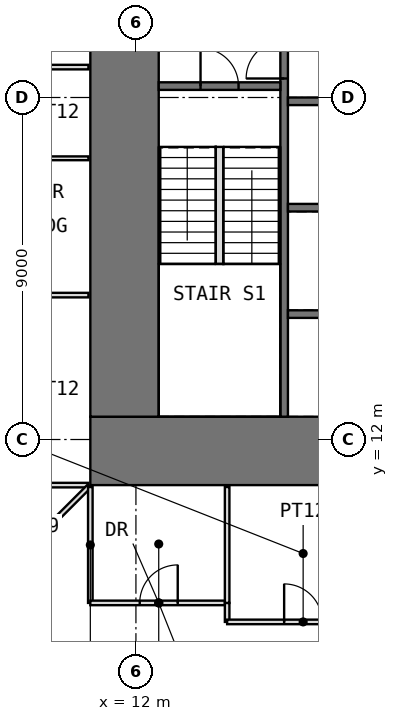
"""IFC4 building model, lengths in metres.
Left out: names, types, materials, properties, quantities, classifications, styles, units other than length and angle.
Written with IfcOpenShell. Run it as: python <this file> out.ifc"""

import sys

from ifc_helpers import new_model, si_unit, direction, frame, frame_2d, origin, place, context, subcontext, project, spatial, rectangle, extrude, element, fill, save


model = new_model("IFC4")
c1 = context("Model", 3, precision=1e-05, world=origin(), true_north=direction((0.0, 1.0)))
c2 = subcontext(c1, "Body", "Model", "MODEL_VIEW")
j1 = project(units=[si_unit("LENGTHUNIT", "METRE"), si_unit("PLANEANGLEUNIT", "RADIAN")], contexts=[c1])
p1 = place(None, origin())
s1 = spatial("IfcSite", under=j1, at=p1, CompositionType="ELEMENT")
p2 = place(p1, origin())
s2 = spatial("IfcBuilding", under=s1, at=p2, CompositionType="ELEMENT")
p3 = place(p2, frame((0.0, 0.0, 30.5)))
s3 = spatial("IfcBuildingStorey", under=s2, at=p3, CompositionType="ELEMENT", Elevation=30.5)
p4 = place(p3, frame((10.8, 11.7, -0.05), z_axis=(0.0, 0.0, 1.0), x_axis=(1.0, 0.0, 0.0)))
e1 = element("IfcWall", 1, at=p4, inside=s3, PredefinedType="SHEAR", context=c2, shape_type="SweptSolid", body=[
    extrude(rectangle(XDim=20.4, YDim=1.8, at=frame_2d((10.2, 0.0))), origin(), (0.0, 0.0, 1.0), 4.0),
])
p5 = place(p4, frame((9.2, 0.0, 0.05)))
e2 = element("IfcOpeningElement", 2, at=p5, cuts=e1, PredefinedType="OPENING", context=c2, shape_type="SweptSolid", body=[
    extrude(rectangle(XDim=2.0, YDim=2.2, at=frame_2d((1.0, 1.1))), frame((0.0, 0.91, 0.0), z_axis=(0.0, -1.0, 0.0), x_axis=(1.0, 0.0, 0.0)), (0.0, 0.0, 1.0), 1.82),
])
p6 = place(p3, frame((11.7, 12.6, -0.05), z_axis=(0.0, 0.0, 1.0), x_axis=(0.0, 1.0, 0.0)))
e3 = element("IfcWall", 3, at=p6, inside=s3, PredefinedType="SHEAR", context=c2, shape_type="SweptSolid", body=[
    extrude(rectangle(XDim=16.8, YDim=1.8, at=frame_2d((8.4, 0.0))), origin(), (0.0, 0.0, 1.0), 4.0),
])
p7 = place(p6, frame((9.9, 0.0, 0.05)))
e4 = element("IfcOpeningElement", 4, at=p7, cuts=e3, PredefinedType="OPENING", context=c2, shape_type="SweptSolid", body=[
    extrude(rectangle(XDim=1.0, YDim=2.2, at=frame_2d((0.5, 1.1))), frame((0.0, 0.91, 0.0), z_axis=(0.0, -1.0, 0.0), x_axis=(1.0, 0.0, 0.0)), (0.0, 0.0, 1.0), 1.82),
])
p8 = place(p3, frame((15.9, 12.6, -0.05), z_axis=(0.0, 0.0, 1.0), x_axis=(0.0, 1.0, 0.0)))
e5 = element("IfcWall", 5, at=p8, inside=s3, PredefinedType="SHEAR", context=c2, shape_type="SweptSolid", body=[
    extrude(rectangle(XDim=16.8, YDim=0.2, at=frame_2d((8.4, 0.0))), origin(), (0.0, 0.0, 1.0), 4.0),
])
p9 = place(p8, frame((8.9, 0.0, 0.05)))
e6 = element("IfcOpeningElement", 6, at=p9, cuts=e5, PredefinedType="OPENING", context=c2, shape_type="SweptSolid", body=[
    extrude(rectangle(XDim=1.0, YDim=2.2, at=frame_2d((0.5, 1.1))), frame((0.0, 0.11, 0.0), z_axis=(0.0, -1.0, 0.0), x_axis=(1.0, 0.0, 0.0)), (0.0, 0.0, 1.0), 0.22),
])
p10 = place(p3, frame((12.6, 21.3, -0.05), z_axis=(0.0, 0.0, 1.0), x_axis=(1.0, 0.0, 0.0)))
e7 = element("IfcWall", 7, at=p10, inside=s3, PredefinedType="SHEAR", context=c2, shape_type="SweptSolid", body=[
    extrude(rectangle(XDim=3.2, YDim=0.2, at=frame_2d((1.6, 0.0))), origin(), (0.0, 0.0, 1.0), 4.0),
])
p11 = place(p10, frame((1.1, 0.0, 0.05)))
e8 = element("IfcOpeningElement", 8, at=p11, cuts=e7, PredefinedType="OPENING", context=c2, shape_type="SweptSolid", body=[
    extrude(rectangle(XDim=1.0, YDim=2.2, at=frame_2d((0.5, 1.1))), frame((0.0, 0.11, 0.0), z_axis=(0.0, -1.0, 0.0), x_axis=(1.0, 0.0, 0.0)), (0.0, 0.0, 1.0), 0.22),
])
for number, where, z_axis, x_axis in (
    (9, (16.0, 15.3, -0.05), (0.0, 0.0, 1.0), (1.0, 0.0, 0.0)),
    (10, (16.0, 18.1, -0.05), (0.0, 0.0, 1.0), (1.0, 0.0, 0.0)),
    (11, (16.0, 20.9, -0.05), (0.0, 0.0, 1.0), (1.0, 0.0, 0.0)),
):
    element("IfcWall", number, at=place(p3, frame(where, z_axis=z_axis, x_axis=x_axis)), inside=s3, PredefinedType="SHEAR", context=c2, shape_type="SweptSolid", body=[
        extrude(rectangle(XDim=3.2, YDim=0.2, at=frame_2d((1.6, 0.0))), origin(), (0.0, 0.0, 1.0), 4.0),
    ])
for number, where, z_axis, x_axis in (
    (12, (7.0, 10.8, 0.0), (0.0, 0.0, 1.0), (1.0, 0.0, 0.0)),
    (13, (7.0, 15.8, 0.0), (0.0, 0.0, 1.0), (1.0, 0.0, 0.0)),
):
    element("IfcWall", number, at=place(p3, frame(where, z_axis=z_axis, x_axis=x_axis)), inside=s3, PredefinedType="PARTITIONING", context=c2, shape_type="SweptSolid", body=[
        extrude(rectangle(XDim=3.75, YDim=0.12, at=frame_2d((1.875, 0.0))), origin(), (0.0, 0.0, 1.0), 3.75),
    ])
p12 = place(p3, frame((7.0, 19.4, 0.0), z_axis=(0.0, 0.0, 1.0), x_axis=(1.0, 0.0, 0.0)))
e14 = element("IfcWall", 14, at=p12, inside=s3, PredefinedType="PARTITIONING", context=c2, shape_type="SweptSolid", body=[
    extrude(rectangle(XDim=3.75, YDim=0.1, at=frame_2d((1.875, 0.0))), origin(), (0.0, 0.0, 1.0), 3.75),
])
p13 = place(p3, frame((7.0, 21.8, 0.0), z_axis=(0.0, 0.0, 1.0), x_axis=(1.0, 0.0, 0.0)))
e15 = element("IfcWall", 15, at=p13, inside=s3, PredefinedType="PARTITIONING", context=c2, shape_type="SweptSolid", body=[
    extrude(rectangle(XDim=3.75, YDim=0.12, at=frame_2d((1.875, 0.0))), origin(), (0.0, 0.0, 1.0), 3.75),
])
p14 = place(p13, frame((0.3, 0.0, 0.0)))
e16 = element("IfcOpeningElement", 16, at=p14, cuts=e15, PredefinedType="OPENING", context=c2, shape_type="SweptSolid", body=[
    extrude(rectangle(XDim=1.0, YDim=2.4, at=frame_2d((0.5, 1.2))), frame((0.0, 0.07, 0.0), z_axis=(0.0, -1.0, 0.0), x_axis=(1.0, 0.0, 0.0)), (0.0, 0.0, 1.0), 0.14),
])
p15 = place(p3, frame((7.11, 7.11, 0.0), z_axis=(0.0, 0.0, 1.0), x_axis=(0.707106781187, 0.707106781187, 0.0)))
e17 = element("IfcWall", 17, at=p15, inside=s3, PredefinedType="PARTITIONING", context=c2, shape_type="SweptSolid", body=[
    extrude(rectangle(XDim=5.168, YDim=0.12, at=frame_2d((2.584, 0.0))), origin(), (0.0, 0.0, 1.0), 3.75),
])
p16 = place(p3, frame((10.8, 7.7, 0.0), z_axis=(0.0, 0.0, 1.0), x_axis=(0.0, 1.0, 0.0)))
e18 = element("IfcWall", 18, at=p16, inside=s3, PredefinedType="PARTITIONING", context=c2, shape_type="SweptSolid", body=[
    extrude(rectangle(XDim=3.05, YDim=0.12, at=frame_2d((1.525, 0.0))), origin(), (0.0, 0.0, 1.0), 3.75),
])
p17 = place(p3, frame((10.8, 7.7, 0.0), z_axis=(0.0, 0.0, 1.0), x_axis=(1.0, 0.0, 0.0)))
e19 = element("IfcWall", 19, at=p17, inside=s3, PredefinedType="PARTITIONING", context=c2, shape_type="SweptSolid", body=[
    extrude(rectangle(XDim=3.6, YDim=0.12, at=frame_2d((1.8, 0.0))), origin(), (0.0, 0.0, 1.0), 3.75),
])
p18 = place(p17, frame((1.3, 0.0, 0.0)))
e20 = element("IfcOpeningElement", 20, at=p18, cuts=e19, PredefinedType="OPENING", context=c2, shape_type="SweptSolid", body=[
    extrude(rectangle(XDim=1.0, YDim=2.2, at=frame_2d((0.5, 1.1))), frame((0.0, 0.07, 0.0), z_axis=(0.0, -1.0, 0.0), x_axis=(1.0, 0.0, 0.0)), (0.0, 0.0, 1.0), 0.14),
])
p19 = place(p3, frame((14.4, 7.2, 0.0), z_axis=(0.0, 0.0, 1.0), x_axis=(0.0, 1.0, 0.0)))
e21 = element("IfcWall", 21, at=p19, inside=s3, PredefinedType="PARTITIONING", context=c2, shape_type="SweptSolid", body=[
    extrude(rectangle(XDim=0.5, YDim=0.12, at=frame_2d((0.25, 0.0))), origin(), (0.0, 0.0, 1.0), 3.75),
])
p20 = place(p3, frame((14.4, 7.2, 0.0), z_axis=(0.0, 0.0, 1.0), x_axis=(1.0, 0.0, 0.0)))
e22 = element("IfcWall", 22, at=p20, inside=s3, PredefinedType="PARTITIONING", context=c2, shape_type="SweptSolid", body=[
    extrude(rectangle(XDim=4.0, YDim=0.12, at=frame_2d((2.0, 0.0))), origin(), (0.0, 0.0, 1.0), 3.75),
])
p21 = place(p20, frame((1.5, 0.0, 0.0)))
e23 = element("IfcOpeningElement", 23, at=p21, cuts=e22, PredefinedType="OPENING", context=c2, shape_type="SweptSolid", body=[
    extrude(rectangle(XDim=1.0, YDim=2.4, at=frame_2d((0.5, 1.2))), frame((0.0, 0.07, 0.0), z_axis=(0.0, -1.0, 0.0), x_axis=(1.0, 0.0, 0.0)), (0.0, 0.0, 1.0), 0.14),
])
p22 = place(p3, frame((14.4, 7.7, 0.0), z_axis=(0.0, 0.0, 1.0), x_axis=(0.0, 1.0, 0.0)))
e24 = element("IfcWall", 24, at=p22, inside=s3, PredefinedType="PARTITIONING", context=c2, shape_type="SweptSolid", body=[
    extrude(rectangle(XDim=3.05, YDim=0.12, at=frame_2d((1.525, 0.0))), origin(), (0.0, 0.0, 1.0), 3.75),
])
p23 = place(p3, frame((14.2, 16.62, 0.0), z_axis=(0.0, 0.0, 1.0), x_axis=(0.0, 1.0, 0.0)))
e25 = element("IfcWall", 25, at=p23, inside=s3, PredefinedType="PARTITIONING", context=c2, shape_type="SweptSolid", body=[
    extrude(rectangle(XDim=3.08, YDim=0.2, at=frame_2d((1.54, 0.0))), origin(), (0.0, 0.0, 1.0), 4.0),
])
p24 = place(p11, origin())
e26 = element("IfcDoor", 26, at=p24, inside=s3, OperationType="SINGLE_SWING_LEFT", PredefinedType="DOOR", context=c2, shape_type="SweptSolid", body=[
    extrude(rectangle(XDim=1.0, YDim=2.2, at=frame_2d((0.5, 1.1))), frame((0.0, 0.025, 0.0), z_axis=(0.0, -1.0, 0.0), x_axis=(1.0, 0.0, 0.0)), (0.0, 0.0, 1.0), 0.05),
])
fill(e8, e26)
p25 = place(p9, origin())
e27 = element("IfcDoor", 27, at=p25, inside=s3, OperationType="SINGLE_SWING_LEFT", PredefinedType="DOOR", context=c2, shape_type="SweptSolid", body=[
    extrude(rectangle(XDim=1.0, YDim=2.2, at=frame_2d((0.5, 1.1))), frame((0.0, 0.025, 0.0), z_axis=(0.0, -1.0, 0.0), x_axis=(1.0, 0.0, 0.0)), (0.0, 0.0, 1.0), 0.05),
])
fill(e6, e27)
p26 = place(p18, origin())
e28 = element("IfcDoor", 28, at=p26, inside=s3, OperationType="SINGLE_SWING_RIGHT", PredefinedType="DOOR", context=c2, shape_type="SweptSolid", body=[
    extrude(rectangle(XDim=1.0, YDim=2.2, at=frame_2d((0.5, 1.1))), frame((0.0, 0.025, 0.0), z_axis=(0.0, -1.0, 0.0), x_axis=(1.0, 0.0, 0.0)), (0.0, 0.0, 1.0), 0.05),
])
fill(e20, e28)
p27 = place(p21, origin())
e29 = element("IfcDoor", 29, at=p27, inside=s3, OperationType="SINGLE_SWING_LEFT", PredefinedType="DOOR", context=c2, shape_type="SweptSolid", body=[
    extrude(rectangle(XDim=1.0, YDim=2.4, at=frame_2d((0.5, 1.2))), frame((0.0, 0.025, 0.0), z_axis=(0.0, -1.0, 0.0), x_axis=(1.0, 0.0, 0.0)), (0.0, 0.0, 1.0), 0.05),
])
fill(e23, e29)
save(model, sys.argv[1])
